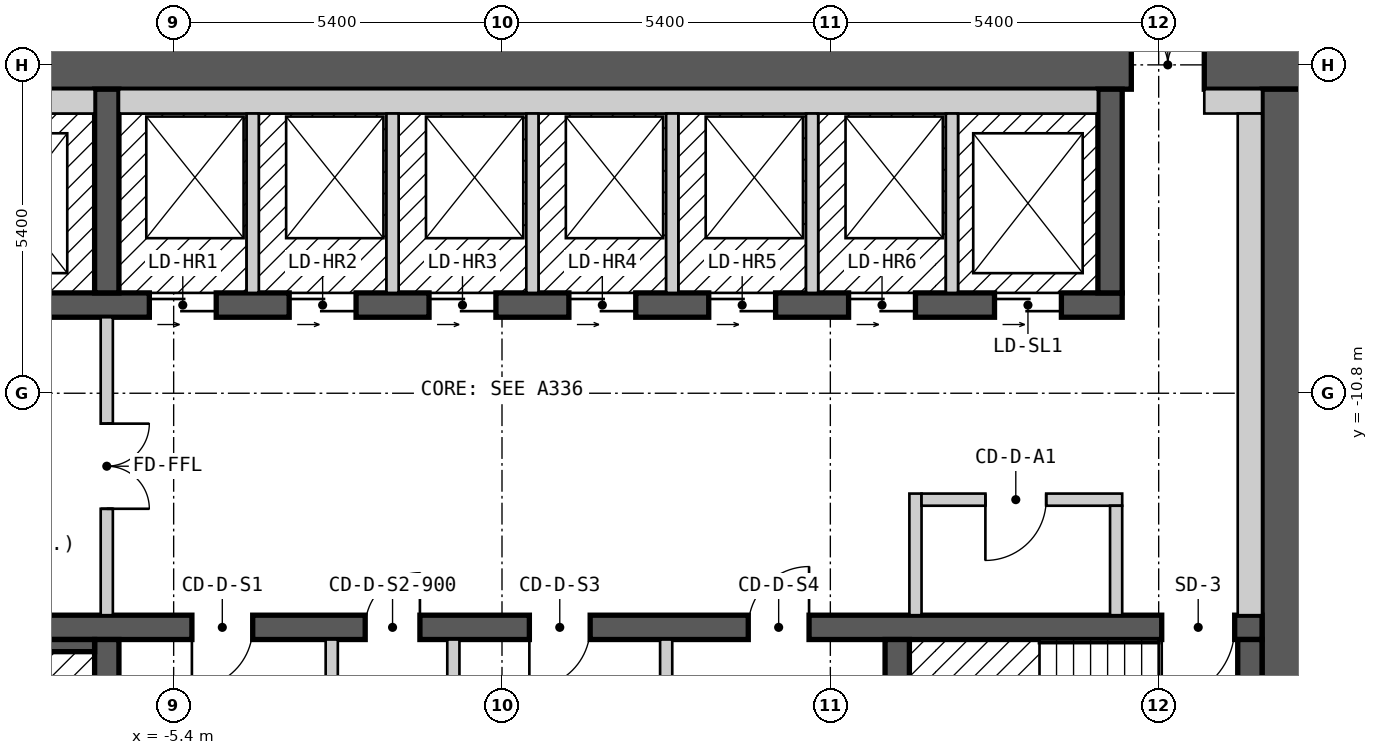
"""IFC4 building model, lengths in metres.
Left out: names, types, materials, properties, quantities, classifications, styles, units other than length and angle.
Written with IfcOpenShell. Run it as: python <this file> out.ifc"""

import sys

from ifc_helpers import new_model, si_unit, direction, frame, frame_2d, origin, place, context, subcontext, project, spatial, rectangle, extrude, element, fill, save


model = new_model("IFC4")
c1 = context("Model", 3, precision=1e-05, world=origin(), true_north=direction((0.0, 1.0)))
c2 = subcontext(c1, "Body", "Model", "MODEL_VIEW")
j1 = project(units=[si_unit("LENGTHUNIT", "METRE"), si_unit("PLANEANGLEUNIT", "RADIAN")], contexts=[c1])
p1 = place(None, origin())
s1 = spatial("IfcSite", under=j1, at=p1, CompositionType="ELEMENT")
p2 = place(p1, origin())
s2 = spatial("IfcBuilding", under=s1, at=p2, CompositionType="ELEMENT")
p3 = place(p2, frame((0.0, 0.0, 129.6)))
s3 = spatial("IfcBuildingStorey", under=s2, at=p3, CompositionType="ELEMENT", Elevation=129.6)
p4 = place(p3, frame((-13.3, -5.4, 0.0), z_axis=(0.0, 0.0, 1.0), x_axis=(1.0, 0.0, 0.0)))
e1 = element("IfcWall", 1, at=p4, inside=s3, PredefinedType="SHEAR", context=c2, shape_type="SweptSolid", body=[
    extrude(rectangle(XDim=26.6, YDim=0.8, at=frame_2d((13.3, 0.0))), origin(), (0.0, 0.0, 1.0), 2.7),
])
p5 = place(p4, frame((23.65, 0.0, 0.0)))
e2 = element("IfcOpeningElement", 2, at=p5, cuts=e1, PredefinedType="OPENING", context=c2, shape_type="SweptSolid", body=[
    extrude(rectangle(XDim=1.2, YDim=2.1, at=frame_2d((0.6, 1.05))), frame((0.0, 0.41, 0.0), z_axis=(0.0, -1.0, 0.0), x_axis=(1.0, 0.0, 0.0)), (0.0, 0.0, 1.0), 0.82),
])
p6 = place(p3, frame((12.9, -18.2, 0.0), z_axis=(0.0, 0.0, 1.0), x_axis=(0.0, 1.0, 0.0)))
e3 = element("IfcWall", 3, at=p6, inside=s3, PredefinedType="SHEAR", context=c2, shape_type="SweptSolid", body=[
    extrude(rectangle(XDim=12.4, YDim=0.8, at=frame_2d((6.2, 0.0))), origin(), (0.0, 0.0, 1.0), 2.7),
])
p7 = place(p3, frame((-12.5, -14.65, 0.0), z_axis=(0.0, 0.0, 1.0), x_axis=(1.0, 0.0, 0.0)))
e4 = element("IfcWall", 4, at=p7, inside=s3, PredefinedType="SHEAR", context=c2, shape_type="SweptSolid", body=[
    extrude(rectangle(XDim=25.0, YDim=0.4, at=frame_2d((12.5, 0.0))), origin(), (0.0, 0.0, 1.0), 2.7),
])
p8 = place(p7, frame((1.7, 0.0, 0.0), z_axis=(0.0, 0.0, 1.0), x_axis=(-1.0, 0.0, 0.0)))
e5 = element("IfcOpeningElement", 5, at=p8, cuts=e4, PredefinedType="OPENING", context=c2, shape_type="SweptSolid", body=[
    extrude(rectangle(XDim=1.2, YDim=2.1, at=frame_2d((0.6, 1.05))), frame((0.0, 0.21, 0.0), z_axis=(0.0, -1.0, 0.0), x_axis=(1.0, 0.0, 0.0)), (0.0, 0.0, 1.0), 0.42),
])
p9 = place(p7, frame((24.55, 0.0, 0.0), z_axis=(0.0, 0.0, 1.0), x_axis=(-1.0, 0.0, 0.0)))
e6 = element("IfcOpeningElement", 6, at=p9, cuts=e4, PredefinedType="OPENING", context=c2, shape_type="SweptSolid", body=[
    extrude(rectangle(XDim=1.2, YDim=2.1, at=frame_2d((0.6, 1.05))), frame((0.0, 0.21, 0.0), z_axis=(0.0, -1.0, 0.0), x_axis=(1.0, 0.0, 0.0)), (0.0, 0.0, 1.0), 0.42),
])
p10 = place(p7, frame((8.4, 0.0, 0.0), z_axis=(0.0, 0.0, 1.0), x_axis=(-1.0, 0.0, 0.0)))
e7 = element("IfcOpeningElement", 7, at=p10, cuts=e4, PredefinedType="OPENING", context=c2, shape_type="SweptSolid", body=[
    extrude(rectangle(XDim=1.0, YDim=2.1, at=frame_2d((0.5, 1.05))), frame((0.0, 0.21, 0.0), z_axis=(0.0, -1.0, 0.0), x_axis=(1.0, 0.0, 0.0)), (0.0, 0.0, 1.0), 0.42),
])
p11 = place(p7, frame((11.15, 0.0, 0.0), z_axis=(0.0, 0.0, 1.0), x_axis=(-1.0, 0.0, 0.0)))
e8 = element("IfcOpeningElement", 8, at=p11, cuts=e4, PredefinedType="OPENING", context=c2, shape_type="SweptSolid", body=[
    extrude(rectangle(XDim=0.9, YDim=2.1, at=frame_2d((0.45, 1.05))), frame((0.0, 0.21, 0.0), z_axis=(0.0, -1.0, 0.0), x_axis=(1.0, 0.0, 0.0)), (0.0, 0.0, 1.0), 0.42),
])
p12 = place(p7, frame((13.95, 0.0, 0.0), z_axis=(0.0, 0.0, 1.0), x_axis=(-1.0, 0.0, 0.0)))
e9 = element("IfcOpeningElement", 9, at=p12, cuts=e4, PredefinedType="OPENING", context=c2, shape_type="SweptSolid", body=[
    extrude(rectangle(XDim=1.0, YDim=2.1, at=frame_2d((0.5, 1.05))), frame((0.0, 0.21, 0.0), z_axis=(0.0, -1.0, 0.0), x_axis=(1.0, 0.0, 0.0)), (0.0, 0.0, 1.0), 0.42),
])
p13 = place(p7, frame((17.55, 0.0, 0.0), z_axis=(0.0, 0.0, 1.0), x_axis=(-1.0, 0.0, 0.0)))
e10 = element("IfcOpeningElement", 10, at=p13, cuts=e4, PredefinedType="OPENING", context=c2, shape_type="SweptSolid", body=[
    extrude(rectangle(XDim=1.0, YDim=2.1, at=frame_2d((0.5, 1.05))), frame((0.0, 0.21, 0.0), z_axis=(0.0, -1.0, 0.0), x_axis=(1.0, 0.0, 0.0)), (0.0, 0.0, 1.0), 0.42),
])
p14 = place(p3, frame((-12.5, -9.35, 0.0), z_axis=(0.0, 0.0, 1.0), x_axis=(1.0, 0.0, 0.0)))
e11 = element("IfcWall", 11, at=p14, inside=s3, PredefinedType="SHEAR", context=c2, shape_type="SweptSolid", body=[
    extrude(rectangle(XDim=22.7, YDim=0.4, at=frame_2d((11.35, 0.0))), origin(), (0.0, 0.0, 1.0), 2.7),
])
p15 = place(p14, frame((1.1, 0.0, 0.0)))
e12 = element("IfcOpeningElement", 12, at=p15, cuts=e11, PredefinedType="OPENING", context=c2, shape_type="SweptSolid", body=[
    extrude(rectangle(XDim=1.1, YDim=2.1, at=frame_2d((0.55, 1.05))), frame((0.0, 0.21, 0.0), z_axis=(0.0, -1.0, 0.0), x_axis=(1.0, 0.0, 0.0)), (0.0, 0.0, 1.0), 0.42),
])
p16 = place(p14, frame((3.9, 0.0, 0.0)))
e13 = element("IfcOpeningElement", 13, at=p16, cuts=e11, PredefinedType="OPENING", context=c2, shape_type="SweptSolid", body=[
    extrude(rectangle(XDim=1.1, YDim=2.1, at=frame_2d((0.55, 1.05))), frame((0.0, 0.21, 0.0), z_axis=(0.0, -1.0, 0.0), x_axis=(1.0, 0.0, 0.0)), (0.0, 0.0, 1.0), 0.42),
])
p17 = place(p14, frame((6.7, 0.0, 0.0)))
e14 = element("IfcOpeningElement", 14, at=p17, cuts=e11, PredefinedType="OPENING", context=c2, shape_type="SweptSolid", body=[
    extrude(rectangle(XDim=1.1, YDim=2.1, at=frame_2d((0.55, 1.05))), frame((0.0, 0.21, 0.0), z_axis=(0.0, -1.0, 0.0), x_axis=(1.0, 0.0, 0.0)), (0.0, 0.0, 1.0), 0.42),
])
p18 = place(p14, frame((9.0, 0.0, 0.0)))
e15 = element("IfcOpeningElement", 15, at=p18, cuts=e11, PredefinedType="OPENING", context=c2, shape_type="SweptSolid", body=[
    extrude(rectangle(XDim=1.1, YDim=2.1, at=frame_2d((0.55, 1.05))), frame((0.0, 0.21, 0.0), z_axis=(0.0, -1.0, 0.0), x_axis=(1.0, 0.0, 0.0)), (0.0, 0.0, 1.0), 0.42),
])
p19 = place(p14, frame((11.3, 0.0, 0.0)))
e16 = element("IfcOpeningElement", 16, at=p19, cuts=e11, PredefinedType="OPENING", context=c2, shape_type="SweptSolid", body=[
    extrude(rectangle(XDim=1.1, YDim=2.1, at=frame_2d((0.55, 1.05))), frame((0.0, 0.21, 0.0), z_axis=(0.0, -1.0, 0.0), x_axis=(1.0, 0.0, 0.0)), (0.0, 0.0, 1.0), 0.42),
])
p20 = place(p14, frame((13.6, 0.0, 0.0)))
e17 = element("IfcOpeningElement", 17, at=p20, cuts=e11, PredefinedType="OPENING", context=c2, shape_type="SweptSolid", body=[
    extrude(rectangle(XDim=1.1, YDim=2.1, at=frame_2d((0.55, 1.05))), frame((0.0, 0.21, 0.0), z_axis=(0.0, -1.0, 0.0), x_axis=(1.0, 0.0, 0.0)), (0.0, 0.0, 1.0), 0.42),
])
p21 = place(p14, frame((15.9, 0.0, 0.0)))
e18 = element("IfcOpeningElement", 18, at=p21, cuts=e11, PredefinedType="OPENING", context=c2, shape_type="SweptSolid", body=[
    extrude(rectangle(XDim=1.1, YDim=2.1, at=frame_2d((0.55, 1.05))), frame((0.0, 0.21, 0.0), z_axis=(0.0, -1.0, 0.0), x_axis=(1.0, 0.0, 0.0)), (0.0, 0.0, 1.0), 0.42),
])
p22 = place(p14, frame((18.2, 0.0, 0.0)))
e19 = element("IfcOpeningElement", 19, at=p22, cuts=e11, PredefinedType="OPENING", context=c2, shape_type="SweptSolid", body=[
    extrude(rectangle(XDim=1.1, YDim=2.1, at=frame_2d((0.55, 1.05))), frame((0.0, 0.21, 0.0), z_axis=(0.0, -1.0, 0.0), x_axis=(1.0, 0.0, 0.0)), (0.0, 0.0, 1.0), 0.42),
])
p23 = place(p14, frame((20.6, 0.0, 0.0)))
e20 = element("IfcOpeningElement", 20, at=p23, cuts=e11, PredefinedType="OPENING", context=c2, shape_type="SweptSolid", body=[
    extrude(rectangle(XDim=1.1, YDim=2.1, at=frame_2d((0.55, 1.05))), frame((0.0, 0.21, 0.0), z_axis=(0.0, -1.0, 0.0), x_axis=(1.0, 0.0, 0.0)), (0.0, 0.0, 1.0), 0.42),
])
for number, where, z_axis, x_axis in (
    (21, (-6.5, -18.2, 0.0), (0.0, 0.0, 1.0), (0.0, 1.0, 0.0)),
    (22, (6.5, -18.2, 0.0), (0.0, 0.0, 1.0), (0.0, 1.0, 0.0)),
    (23, (-6.5, -9.15, 0.0), (0.0, 0.0, 1.0), (0.0, 1.0, 0.0)),
    (24, (10.0, -9.15, 0.0), (0.0, 0.0, 1.0), (0.0, 1.0, 0.0)),
):
    element("IfcWall", number, at=place(p3, frame(where, z_axis=z_axis, x_axis=x_axis)), inside=s3, PredefinedType="SHEAR", context=c2, shape_type="SweptSolid", body=[
        extrude(rectangle(XDim=3.35, YDim=0.4, at=frame_2d((1.675, 0.0))), origin(), (0.0, 0.0, 1.0), 2.7),
    ])
p24 = place(p3, frame((-12.1, -6.0, 0.0), z_axis=(0.0, 0.0, 1.0), x_axis=(1.0, 0.0, 0.0)))
e25 = element("IfcWall", 25, at=p24, inside=s3, PredefinedType="SOLIDWALL", context=c2, shape_type="SweptSolid", body=[
    extrude(rectangle(XDim=5.4, YDim=0.4, at=frame_2d((2.7, 0.0))), origin(), (0.0, 0.0, 1.0), 2.7),
])
p25 = place(p3, frame((-10.8, -14.95, 0.0), z_axis=(0.0, 0.0, 1.0), x_axis=(1.0, 0.0, 0.0)))
e26 = element("IfcWall", 26, at=p25, inside=s3, PredefinedType="SOLIDWALL", context=c2, shape_type="SweptSolid", body=[
    extrude(rectangle(XDim=4.1, YDim=0.2, at=frame_2d((2.05, 0.0))), origin(), (0.0, 0.0, 1.0), 2.7),
])
p26 = place(p3, frame((-6.5, -14.45, 0.0), z_axis=(0.0, 0.0, 1.0), x_axis=(0.0, 1.0, 0.0)))
e27 = element("IfcWall", 27, at=p26, inside=s3, PredefinedType="PARTITIONING", context=c2, shape_type="SweptSolid", body=[
    extrude(rectangle(XDim=4.9, YDim=0.2, at=frame_2d((2.45, 0.0))), origin(), (0.0, 0.0, 1.0), 2.7),
])
p27 = place(p26, frame((3.15, 0.0, 0.0), z_axis=(0.0, 0.0, 1.0), x_axis=(-1.0, 0.0, 0.0)))
e28 = element("IfcOpeningElement", 28, at=p27, cuts=e27, PredefinedType="OPENING", context=c2, shape_type="SweptSolid", body=[
    extrude(rectangle(XDim=1.4, YDim=2.1, at=frame_2d((0.7, 1.05))), frame((0.0, 0.11, 0.0), z_axis=(0.0, -1.0, 0.0), x_axis=(1.0, 0.0, 0.0)), (0.0, 0.0, 1.0), 0.22),
])
p28 = place(p3, frame((-6.3, -6.0, 0.0), z_axis=(0.0, 0.0, 1.0), x_axis=(1.0, 0.0, 0.0)))
e29 = element("IfcWall", 29, at=p28, inside=s3, PredefinedType="SOLIDWALL", context=c2, shape_type="SweptSolid", body=[
    extrude(rectangle(XDim=16.1, YDim=0.4, at=frame_2d((8.05, 0.0))), origin(), (0.0, 0.0, 1.0), 2.7),
])
p29 = place(p3, frame((-4.1, -9.15, 0.0), z_axis=(0.0, 0.0, 1.0), x_axis=(0.0, 1.0, 0.0)))
e30 = element("IfcWall", 30, at=p29, inside=s3, PredefinedType="SOLIDWALL", context=c2, shape_type="SweptSolid", body=[
    extrude(rectangle(XDim=2.95, YDim=0.2, at=frame_2d((1.475, 0.0))), origin(), (0.0, 0.0, 1.0), 2.7),
])
p30 = place(p3, frame((-2.8, -17.8, 0.0), z_axis=(0.0, 0.0, 1.0), x_axis=(0.0, 1.0, 0.0)))
e31 = element("IfcWall", 31, at=p30, inside=s3, PredefinedType="PARTITIONING", context=c2, shape_type="SweptSolid", body=[
    extrude(rectangle(XDim=2.95, YDim=0.2, at=frame_2d((1.475, 0.0))), origin(), (0.0, 0.0, 1.0), 2.7),
])
p31 = place(p3, frame((-1.8, -9.15, 0.0), z_axis=(0.0, 0.0, 1.0), x_axis=(0.0, 1.0, 0.0)))
e32 = element("IfcWall", 32, at=p31, inside=s3, PredefinedType="SOLIDWALL", context=c2, shape_type="SweptSolid", body=[
    extrude(rectangle(XDim=2.95, YDim=0.2, at=frame_2d((1.475, 0.0))), origin(), (0.0, 0.0, 1.0), 2.7),
])
p32 = place(p3, frame((-0.8, -17.8, 0.0), z_axis=(0.0, 0.0, 1.0), x_axis=(0.0, 1.0, 0.0)))
e33 = element("IfcWall", 33, at=p32, inside=s3, PredefinedType="PARTITIONING", context=c2, shape_type="SweptSolid", body=[
    extrude(rectangle(XDim=2.95, YDim=0.2, at=frame_2d((1.475, 0.0))), origin(), (0.0, 0.0, 1.0), 2.7),
])
p33 = place(p3, frame((0.5, -9.15, 0.0), z_axis=(0.0, 0.0, 1.0), x_axis=(0.0, 1.0, 0.0)))
e34 = element("IfcWall", 34, at=p33, inside=s3, PredefinedType="SOLIDWALL", context=c2, shape_type="SweptSolid", body=[
    extrude(rectangle(XDim=2.95, YDim=0.2, at=frame_2d((1.475, 0.0))), origin(), (0.0, 0.0, 1.0), 2.7),
])
p34 = place(p3, frame((2.7, -17.8, 0.0), z_axis=(0.0, 0.0, 1.0), x_axis=(0.0, 1.0, 0.0)))
e35 = element("IfcWall", 35, at=p34, inside=s3, PredefinedType="PARTITIONING", context=c2, shape_type="SweptSolid", body=[
    extrude(rectangle(XDim=2.95, YDim=0.2, at=frame_2d((1.475, 0.0))), origin(), (0.0, 0.0, 1.0), 2.7),
])
for number, where, z_axis, x_axis in (
    (36, (2.8, -9.15, 0.0), (0.0, 0.0, 1.0), (0.0, 1.0, 0.0)),
    (37, (5.1, -9.15, 0.0), (0.0, 0.0, 1.0), (0.0, 1.0, 0.0)),
):
    element("IfcWall", number, at=place(p3, frame(where, z_axis=z_axis, x_axis=x_axis)), inside=s3, PredefinedType="SOLIDWALL", context=c2, shape_type="SweptSolid", body=[
        extrude(rectangle(XDim=2.95, YDim=0.2, at=frame_2d((1.475, 0.0))), origin(), (0.0, 0.0, 1.0), 2.7),
    ])
p35 = place(p3, frame((6.8, -14.45, 0.0), z_axis=(0.0, 0.0, 1.0), x_axis=(0.0, 1.0, 0.0)))
e38 = element("IfcWall", 38, at=p35, inside=s3, PredefinedType="PARTITIONING", context=c2, shape_type="SweptSolid", body=[
    extrude(rectangle(XDim=2.0, YDim=0.2, at=frame_2d((1.0, 0.0))), origin(), (0.0, 0.0, 1.0), 2.7),
])
p36 = place(p3, frame((6.9, -12.55, 0.0), z_axis=(0.0, 0.0, 1.0), x_axis=(1.0, 0.0, 0.0)))
e39 = element("IfcWall", 39, at=p36, inside=s3, PredefinedType="PARTITIONING", context=c2, shape_type="SweptSolid", body=[
    extrude(rectangle(XDim=3.3, YDim=0.2, at=frame_2d((1.65, 0.0))), origin(), (0.0, 0.0, 1.0), 2.7),
])
p37 = place(p36, frame((2.05, 0.0, 0.0), z_axis=(0.0, 0.0, 1.0), x_axis=(-1.0, 0.0, 0.0)))
e40 = element("IfcOpeningElement", 40, at=p37, cuts=e39, PredefinedType="OPENING", context=c2, shape_type="SweptSolid", body=[
    extrude(rectangle(XDim=1.0, YDim=2.1, at=frame_2d((0.5, 1.05))), frame((0.0, 0.11, 0.0), z_axis=(0.0, -1.0, 0.0), x_axis=(1.0, 0.0, 0.0)), (0.0, 0.0, 1.0), 0.22),
])
p38 = place(p3, frame((7.4, -9.15, 0.0), z_axis=(0.0, 0.0, 1.0), x_axis=(0.0, 1.0, 0.0)))
e41 = element("IfcWall", 41, at=p38, inside=s3, PredefinedType="SOLIDWALL", context=c2, shape_type="SweptSolid", body=[
    extrude(rectangle(XDim=2.95, YDim=0.2, at=frame_2d((1.475, 0.0))), origin(), (0.0, 0.0, 1.0), 2.7),
])
p39 = place(p3, frame((10.1, -14.45, 0.0), z_axis=(0.0, 0.0, 1.0), x_axis=(0.0, 1.0, 0.0)))
e42 = element("IfcWall", 42, at=p39, inside=s3, PredefinedType="PARTITIONING", context=c2, shape_type="SweptSolid", body=[
    extrude(rectangle(XDim=1.8, YDim=0.2, at=frame_2d((0.9, 0.0))), origin(), (0.0, 0.0, 1.0), 2.7),
])
p40 = place(p3, frame((11.55, -6.0, 0.0), z_axis=(0.0, 0.0, 1.0), x_axis=(1.0, 0.0, 0.0)))
e43 = element("IfcWall", 43, at=p40, inside=s3, PredefinedType="PARTITIONING", context=c2, shape_type="SweptSolid", body=[
    extrude(rectangle(XDim=0.95, YDim=0.4, at=frame_2d((0.475, 0.0))), origin(), (0.0, 0.0, 1.0), 2.7),
])
p41 = place(p3, frame((12.3, -17.6, 0.0), z_axis=(0.0, 0.0, 1.0), x_axis=(0.0, 1.0, 0.0)))
e44 = element("IfcWall", 44, at=p41, inside=s3, PredefinedType="SOLIDWALL", context=c2, shape_type="SweptSolid", body=[
    extrude(rectangle(XDim=2.75, YDim=0.4, at=frame_2d((1.375, 0.0))), origin(), (0.0, 0.0, 1.0), 2.7),
])
p42 = place(p3, frame((12.3, -14.45, 0.0), z_axis=(0.0, 0.0, 1.0), x_axis=(0.0, 1.0, 0.0)))
e45 = element("IfcWall", 45, at=p42, inside=s3, PredefinedType="PARTITIONING", context=c2, shape_type="SweptSolid", body=[
    extrude(rectangle(XDim=8.25, YDim=0.4, at=frame_2d((4.125, 0.0))), origin(), (0.0, 0.0, 1.0), 2.7),
])
p43 = place(p17, origin())
e46 = element("IfcDoor", 46, at=p43, inside=s3, OperationType="DOUBLE_DOOR_SLIDING", PredefinedType="DOOR", context=c2, shape_type="SweptSolid", body=[
    extrude(rectangle(XDim=1.1, YDim=2.1, at=frame_2d((0.55, 1.05))), frame((0.0, 0.025, 0.0), z_axis=(0.0, -1.0, 0.0), x_axis=(1.0, 0.0, 0.0)), (0.0, 0.0, 1.0), 0.05),
])
fill(e14, e46)
p44 = place(p18, origin())
e47 = element("IfcDoor", 47, at=p44, inside=s3, OperationType="DOUBLE_DOOR_SLIDING", PredefinedType="DOOR", context=c2, shape_type="SweptSolid", body=[
    extrude(rectangle(XDim=1.1, YDim=2.1, at=frame_2d((0.55, 1.05))), frame((0.0, 0.025, 0.0), z_axis=(0.0, -1.0, 0.0), x_axis=(1.0, 0.0, 0.0)), (0.0, 0.0, 1.0), 0.05),
])
fill(e15, e47)
p45 = place(p19, origin())
e48 = element("IfcDoor", 48, at=p45, inside=s3, OperationType="DOUBLE_DOOR_SLIDING", PredefinedType="DOOR", context=c2, shape_type="SweptSolid", body=[
    extrude(rectangle(XDim=1.1, YDim=2.1, at=frame_2d((0.55, 1.05))), frame((0.0, 0.025, 0.0), z_axis=(0.0, -1.0, 0.0), x_axis=(1.0, 0.0, 0.0)), (0.0, 0.0, 1.0), 0.05),
])
fill(e16, e48)
p46 = place(p20, origin())
e49 = element("IfcDoor", 49, at=p46, inside=s3, OperationType="DOUBLE_DOOR_SLIDING", PredefinedType="DOOR", context=c2, shape_type="SweptSolid", body=[
    extrude(rectangle(XDim=1.1, YDim=2.1, at=frame_2d((0.55, 1.05))), frame((0.0, 0.025, 0.0), z_axis=(0.0, -1.0, 0.0), x_axis=(1.0, 0.0, 0.0)), (0.0, 0.0, 1.0), 0.05),
])
fill(e17, e49)
p47 = place(p21, origin())
e50 = element("IfcDoor", 50, at=p47, inside=s3, OperationType="DOUBLE_DOOR_SLIDING", PredefinedType="DOOR", context=c2, shape_type="SweptSolid", body=[
    extrude(rectangle(XDim=1.1, YDim=2.1, at=frame_2d((0.55, 1.05))), frame((0.0, 0.025, 0.0), z_axis=(0.0, -1.0, 0.0), x_axis=(1.0, 0.0, 0.0)), (0.0, 0.0, 1.0), 0.05),
])
fill(e18, e50)
p48 = place(p22, origin())
e51 = element("IfcDoor", 51, at=p48, inside=s3, OperationType="DOUBLE_DOOR_SLIDING", PredefinedType="DOOR", context=c2, shape_type="SweptSolid", body=[
    extrude(rectangle(XDim=1.1, YDim=2.1, at=frame_2d((0.55, 1.05))), frame((0.0, 0.025, 0.0), z_axis=(0.0, -1.0, 0.0), x_axis=(1.0, 0.0, 0.0)), (0.0, 0.0, 1.0), 0.05),
])
fill(e19, e51)
p49 = place(p23, origin())
e52 = element("IfcDoor", 52, at=p49, inside=s3, OperationType="DOUBLE_DOOR_SLIDING", PredefinedType="DOOR", context=c2, shape_type="SweptSolid", body=[
    extrude(rectangle(XDim=1.1, YDim=2.1, at=frame_2d((0.55, 1.05))), frame((0.0, 0.025, 0.0), z_axis=(0.0, -1.0, 0.0), x_axis=(1.0, 0.0, 0.0)), (0.0, 0.0, 1.0), 0.05),
])
fill(e20, e52)
p50 = place(p9, origin())
e53 = element("IfcDoor", 53, at=p50, inside=s3, OperationType="SINGLE_SWING_RIGHT", PredefinedType="DOOR", context=c2, shape_type="SweptSolid", body=[
    extrude(rectangle(XDim=1.2, YDim=2.1, at=frame_2d((0.6, 1.05))), frame((0.0, 0.025, 0.0), z_axis=(0.0, -1.0, 0.0), x_axis=(1.0, 0.0, 0.0)), (0.0, 0.0, 1.0), 0.05),
])
fill(e6, e53)
p51 = place(p27, origin())
e54 = element("IfcDoor", 54, at=p51, inside=s3, OperationType="DOUBLE_DOOR_SINGLE_SWING", PredefinedType="DOOR", context=c2, shape_type="SweptSolid", body=[
    extrude(rectangle(XDim=1.4, YDim=2.1, at=frame_2d((0.7, 1.05))), frame((0.0, 0.025, 0.0), z_axis=(0.0, -1.0, 0.0), x_axis=(1.0, 0.0, 0.0)), (0.0, 0.0, 1.0), 0.05),
])
fill(e28, e54)
p52 = place(p5, origin())
e55 = element("IfcDoor", 55, at=p52, inside=s3, OperationType="DOUBLE_DOOR_SINGLE_SWING", PredefinedType="DOOR", context=c2, shape_type="SweptSolid", body=[
    extrude(rectangle(XDim=1.2, YDim=2.1, at=frame_2d((0.6, 1.05))), frame((0.0, 0.025, 0.0), z_axis=(0.0, -1.0, 0.0), x_axis=(1.0, 0.0, 0.0)), (0.0, 0.0, 1.0), 0.05),
])
fill(e2, e55)
p53 = place(p37, origin())
e56 = element("IfcDoor", 56, at=p53, inside=s3, OperationType="SINGLE_SWING_RIGHT", PredefinedType="DOOR", context=c2, shape_type="SweptSolid", body=[
    extrude(rectangle(XDim=1.0, YDim=2.1, at=frame_2d((0.5, 1.05))), frame((0.0, 0.025, 0.0), z_axis=(0.0, -1.0, 0.0), x_axis=(1.0, 0.0, 0.0)), (0.0, 0.0, 1.0), 0.05),
])
fill(e40, e56)
p54 = place(p10, origin())
e57 = element("IfcDoor", 57, at=p54, inside=s3, OperationType="SINGLE_SWING_RIGHT", PredefinedType="DOOR", context=c2, shape_type="SweptSolid", body=[
    extrude(rectangle(XDim=1.0, YDim=2.1, at=frame_2d((0.5, 1.05))), frame((0.0, 0.025, 0.0), z_axis=(0.0, -1.0, 0.0), x_axis=(1.0, 0.0, 0.0)), (0.0, 0.0, 1.0), 0.05),
])
fill(e7, e57)
p55 = place(p11, origin())
e58 = element("IfcDoor", 58, at=p55, inside=s3, OperationType="SINGLE_SWING_LEFT", PredefinedType="DOOR", context=c2, shape_type="SweptSolid", body=[
    extrude(rectangle(XDim=0.9, YDim=2.1, at=frame_2d((0.45, 1.05))), frame((0.0, 0.025, 0.0), z_axis=(0.0, -1.0, 0.0), x_axis=(1.0, 0.0, 0.0)), (0.0, 0.0, 1.0), 0.05),
])
fill(e8, e58)
p56 = place(p12, origin())
e59 = element("IfcDoor", 59, at=p56, inside=s3, OperationType="SINGLE_SWING_RIGHT", PredefinedType="DOOR", context=c2, shape_type="SweptSolid", body=[
    extrude(rectangle(XDim=1.0, YDim=2.1, at=frame_2d((0.5, 1.05))), frame((0.0, 0.025, 0.0), z_axis=(0.0, -1.0, 0.0), x_axis=(1.0, 0.0, 0.0)), (0.0, 0.0, 1.0), 0.05),
])
fill(e9, e59)
p57 = place(p13, origin())
e60 = element("IfcDoor", 60, at=p57, inside=s3, OperationType="SINGLE_SWING_LEFT", PredefinedType="DOOR", context=c2, shape_type="SweptSolid", body=[
    extrude(rectangle(XDim=1.0, YDim=2.1, at=frame_2d((0.5, 1.05))), frame((0.0, 0.025, 0.0), z_axis=(0.0, -1.0, 0.0), x_axis=(1.0, 0.0, 0.0)), (0.0, 0.0, 1.0), 0.05),
])
fill(e10, e60)
save(model, sys.argv[1])
